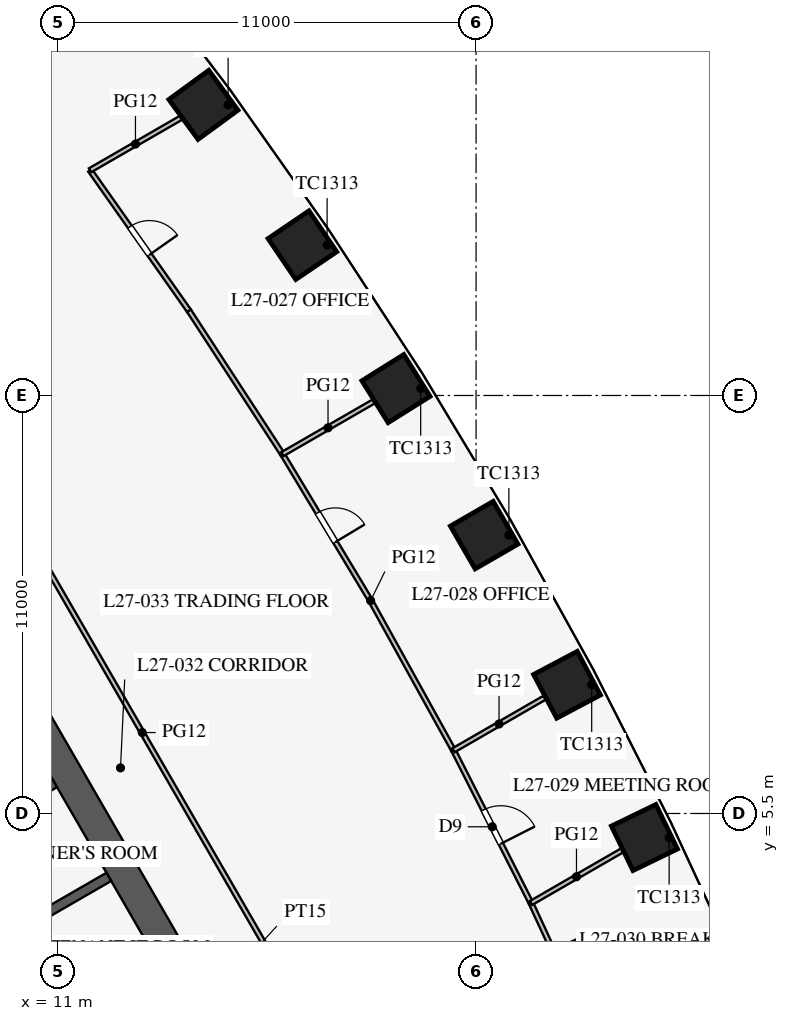
"""IFC4 building model, lengths in metres.
Left out: names, types, materials, properties, quantities, classifications, styles, units other than length and angle.
Written with IfcOpenShell. Run it as: python <this file> out.ifc"""

import sys

from ifc_helpers import new_model, si_unit, direction, frame, frame_2d, origin, origin_2d, place, context, subcontext, project, spatial, rectangle, extrude, element, fill, save


model = new_model("IFC4")
c1 = context("Model", 3, precision=1e-05, world=origin(), true_north=direction((0.0, 1.0)))
c2 = subcontext(c1, "Body", "Model", "MODEL_VIEW")
j1 = project(units=[si_unit("LENGTHUNIT", "METRE"), si_unit("PLANEANGLEUNIT", "RADIAN")], contexts=[c1])
p1 = place(None, origin())
s1 = spatial("IfcSite", under=j1, at=p1, CompositionType="ELEMENT")
p2 = place(p1, origin())
s2 = spatial("IfcBuilding", under=s1, at=p2, CompositionType="ELEMENT")
p3 = place(p2, frame((0.0, 0.0, 119.9)))
s3 = spatial("IfcBuildingStorey", under=s2, at=p3, CompositionType="ELEMENT", Elevation=119.9)
for number, where, z_axis, x_axis in (
    (1, (26.43, 4.867, 0.0), (0.0, 0.0, 1.0), (-0.436, 0.9, 0.0)),
    (2, (24.393, 8.887, 0.0), (0.0, 0.0, 1.0), (-0.468, 0.883, 0.0)),
    (3, (22.213, 12.825, 0.0), (0.0, 0.0, 1.0), (-0.5, 0.866, 0.0)),
    (4, (19.893, 16.681, 0.0), (0.0, 0.0, 1.0), (-0.531, 0.847, 0.0)),
    (5, (17.43, 20.456, 0.0), (0.0, 0.0, 1.0), (-0.561, 0.828, 0.0)),
    (6, (14.825, 24.148, 0.0), (0.0, 0.0, 1.0), (-0.591, 0.807, 0.0)),
):
    element("IfcColumn", number, at=place(p3, frame(where, z_axis=z_axis, x_axis=x_axis)), inside=s3, PredefinedType="COLUMN", context=c2, shape_type="SweptSolid", body=[
        extrude(rectangle(XDim=1.3, YDim=1.3, at=origin_2d()), origin(), (0.0, 0.0, 1.0), 4.2),
    ])
p4 = place(p3, frame((16.743, -3.0, 0.0), z_axis=(0.0, 0.0, 1.0), x_axis=(-0.500002442456, 0.866023993627, 0.0)))
e7 = element("IfcWall", 7, at=p4, inside=s3, PredefinedType="SHEAR", context=c2, shape_type="SweptSolid", body=[
    extrude(rectangle(XDim=21.939, YDim=0.8, at=frame_2d((10.97, 0.0))), origin(), (0.0, 0.0, 1.0), 4.2),
])
p5 = place(p4, frame((17.27, 0.0, 0.0)))
e8 = element("IfcOpeningElement", 8, at=p5, cuts=e7, PredefinedType="OPENING", context=c2, shape_type="SweptSolid", body=[
    extrude(rectangle(XDim=1.2, YDim=2.1, at=frame_2d((0.6, 1.05))), frame((0.0, 0.41, 0.0), z_axis=(0.0, -1.0, 0.0), x_axis=(1.0, 0.0, 0.0)), (0.0, 0.0, 1.0), 0.82),
])
p6 = place(p4, frame((3.47, 0.0, 0.0)))
e9 = element("IfcOpeningElement", 9, at=p6, cuts=e7, PredefinedType="OPENING", context=c2, shape_type="SweptSolid", body=[
    extrude(rectangle(XDim=1.2, YDim=2.1, at=frame_2d((0.6, 1.05))), frame((0.0, 0.41, 0.0), z_axis=(0.0, -1.0, 0.0), x_axis=(1.0, 0.0, 0.0)), (0.0, 0.0, 1.0), 0.82),
])
p7 = place(p3, frame((11.424, 0.014, 0.0), z_axis=(0.0, 0.0, 1.0), x_axis=(-0.500001763848, 0.866024385424, 0.0)))
e10 = element("IfcWall", 10, at=p7, inside=s3, PredefinedType="SHEAR", context=c2, shape_type="SweptSolid", body=[
    extrude(rectangle(XDim=11.4, YDim=0.25, at=frame_2d((5.7, 0.0))), origin(), (0.0, 0.0, 1.0), 4.2),
])
p8 = place(p7, frame((0.975, 0.0, 0.0)))
e11 = element("IfcOpeningElement", 11, at=p8, cuts=e10, PredefinedType="OPENING", context=c2, shape_type="SweptSolid", body=[
    extrude(rectangle(XDim=0.9, YDim=2.1, at=frame_2d((0.45, 1.05))), frame((0.0, 0.135, 0.0), z_axis=(0.0, -1.0, 0.0), x_axis=(1.0, 0.0, 0.0)), (0.0, 0.0, 1.0), 0.27),
])
p9 = place(p7, frame((3.825, 0.0, 0.0)))
e12 = element("IfcOpeningElement", 12, at=p9, cuts=e10, PredefinedType="OPENING", context=c2, shape_type="SweptSolid", body=[
    extrude(rectangle(XDim=0.9, YDim=2.1, at=frame_2d((0.45, 1.05))), frame((0.0, 0.135, 0.0), z_axis=(0.0, -1.0, 0.0), x_axis=(1.0, 0.0, 0.0)), (0.0, 0.0, 1.0), 0.27),
])
for number, where, z_axis, x_axis in (
    (13, (10.107, 2.544, 0.0), (0.0, 0.0, 1.0), (0.866, 0.5, 0.0)),
    (14, (8.682, 5.012, 0.0), (0.0, 0.0, 1.0), (0.866, 0.5, 0.0)),
):
    element("IfcWall", number, at=place(p3, frame(where, z_axis=z_axis, x_axis=x_axis)), inside=s3, PredefinedType="SHEAR", context=c2, shape_type="SweptSolid", body=[
        extrude(rectangle(XDim=2.575, YDim=0.25, at=frame_2d((1.288, 0.0))), origin(), (0.0, 0.0, 1.0), 4.2),
    ])
p10 = place(p3, frame((26.415, -15.231, 0.0), z_axis=(0.0, 0.0, 1.0), x_axis=(-0.50000091641, 0.866024874695, 0.0)))
e15 = element("IfcWall", 15, at=p10, inside=s3, PredefinedType="PARTITIONING", context=c2, shape_type="SweptSolid", body=[
    extrude(rectangle(XDim=52.796, YDim=0.12, at=frame_2d((26.398, 0.0))), origin(), (0.0, 0.0, 1.0), 2.9),
])
p11 = place(p10, frame((10.2, 0.0, 0.15)))
e16 = element("IfcOpeningElement", 16, at=p11, cuts=e15, PredefinedType="OPENING", context=c2, shape_type="SweptSolid", body=[
    extrude(rectangle(XDim=1.8, YDim=2.1, at=frame_2d((0.9, 1.05))), frame((0.0, 0.07, 0.0), z_axis=(0.0, -1.0, 0.0), x_axis=(1.0, 0.0, 0.0)), (0.0, 0.0, 1.0), 0.14),
])
p12 = place(p10, frame((40.8, 0.0, 0.15)))
e17 = element("IfcOpeningElement", 17, at=p12, cuts=e15, PredefinedType="OPENING", context=c2, shape_type="SweptSolid", body=[
    extrude(rectangle(XDim=1.8, YDim=2.1, at=frame_2d((0.9, 1.05))), frame((0.0, 0.07, 0.0), z_axis=(0.0, -1.0, 0.0), x_axis=(1.0, 0.0, 0.0)), (0.0, 0.0, 1.0), 0.14),
])
p13 = place(p3, frame((19.226, 11.1, 0.0), z_axis=(0.0, 0.0, 1.0), x_axis=(-0.515548366618, 0.856860479703, 0.0)))
e18 = element("IfcWall", 18, at=p13, inside=s3, PredefinedType="PARTITIONING", context=c2, shape_type="SweptSolid", body=[
    extrude(rectangle(XDim=4.501, YDim=0.12, at=frame_2d((2.25, 0.0))), origin(), (0.0, 0.0, 1.0), 2.9),
])
p14 = place(p13, frame((1.8, 0.0, 0.15)))
e19 = element("IfcOpeningElement", 19, at=p14, cuts=e18, PredefinedType="OPENING", context=c2, shape_type="SweptSolid", body=[
    extrude(rectangle(XDim=0.9, YDim=2.1, at=frame_2d((0.45, 1.05))), frame((0.0, 0.07, 0.0), z_axis=(0.0, -1.0, 0.0), x_axis=(1.0, 0.0, 0.0)), (0.0, 0.0, 1.0), 0.14),
])
p15 = place(p3, frame((16.905, 14.956, 0.0), z_axis=(0.0, 0.0, 1.0), x_axis=(-0.546069464151, 0.837739900161, 0.0)))
e20 = element("IfcWall", 20, at=p15, inside=s3, PredefinedType="PARTITIONING", context=c2, shape_type="SweptSolid", body=[
    extrude(rectangle(XDim=4.507, YDim=0.12, at=frame_2d((2.253, 0.0))), origin(), (0.0, 0.0, 1.0), 2.9),
])
p16 = place(p3, frame((14.444, 18.732, 0.0), z_axis=(0.0, 0.0, 1.0), x_axis=(-0.576023283708, 0.817433285734, 0.0)))
e21 = element("IfcWall", 21, at=p16, inside=s3, PredefinedType="PARTITIONING", context=c2, shape_type="SweptSolid", body=[
    extrude(rectangle(XDim=4.519, YDim=0.12, at=frame_2d((2.259, 0.0))), origin(), (0.0, 0.0, 1.0), 2.9),
])
p17 = place(p16, frame((1.8, 0.0, 0.15)))
e22 = element("IfcOpeningElement", 22, at=p17, cuts=e21, PredefinedType="OPENING", context=c2, shape_type="SweptSolid", body=[
    extrude(rectangle(XDim=0.9, YDim=2.1, at=frame_2d((0.45, 1.05))), frame((0.0, 0.07, 0.0), z_axis=(0.0, -1.0, 0.0), x_axis=(1.0, 0.0, 0.0)), (0.0, 0.0, 1.0), 0.14),
])
p18 = place(p3, frame((25.342, -0.958, 0.0), z_axis=(0.0, 0.0, 1.0), x_axis=(-0.419883773418, 0.907577884713, 0.0)))
e23 = element("IfcWall", 23, at=p18, inside=s3, PredefinedType="PARTITIONING", context=c2, shape_type="SweptSolid", body=[
    extrude(rectangle(XDim=4.519, YDim=0.12, at=frame_2d((2.259, 0.0))), origin(), (0.0, 0.0, 1.0), 2.9),
])
p19 = place(p18, frame((1.35, 0.0, 0.15)))
e24 = element("IfcOpeningElement", 24, at=p19, cuts=e23, PredefinedType="OPENING", context=c2, shape_type="SweptSolid", body=[
    extrude(rectangle(XDim=1.8, YDim=2.1, at=frame_2d((0.9, 1.05))), frame((0.0, 0.07, 0.0), z_axis=(0.0, -1.0, 0.0), x_axis=(1.0, 0.0, 0.0)), (0.0, 0.0, 1.0), 0.14),
])
p20 = place(p3, frame((21.405, 7.162, 0.0), z_axis=(0.0, 0.0, 1.0), x_axis=(-0.484292898211, 0.874905931368, 0.0)))
e25 = element("IfcWall", 25, at=p20, inside=s3, PredefinedType="PARTITIONING", context=c2, shape_type="SweptSolid", body=[
    extrude(rectangle(XDim=4.501, YDim=0.12, at=frame_2d((2.25, 0.0))), origin(), (0.0, 0.0, 1.0), 2.9),
])
p21 = place(p3, frame((23.444, 3.143, 0.0), z_axis=(0.0, 0.0, 1.0), x_axis=(-0.452471679136, 0.891778772779, 0.0)))
e26 = element("IfcWall", 26, at=p21, inside=s3, PredefinedType="PARTITIONING", context=c2, shape_type="SweptSolid", body=[
    extrude(rectangle(XDim=4.507, YDim=0.12, at=frame_2d((2.253, 0.0))), origin(), (0.0, 0.0, 1.0), 2.9),
])
p22 = place(p21, frame((1.75, 0.0, 0.15)))
e27 = element("IfcOpeningElement", 27, at=p22, cuts=e26, PredefinedType="OPENING", context=c2, shape_type="SweptSolid", body=[
    extrude(rectangle(XDim=1.0, YDim=2.1, at=frame_2d((0.5, 1.05))), frame((0.0, 0.07, 0.0), z_axis=(0.0, -1.0, 0.0), x_axis=(1.0, 0.0, 0.0)), (0.0, 0.0, 1.0), 0.14),
])
p23 = place(p3, frame((11.842, 22.425, 0.0), z_axis=(0.0, 0.0, 1.0), x_axis=(0.866053089527, 0.499952043821, 0.0)))
e28 = element("IfcWall", 28, at=p23, inside=s3, PredefinedType="PARTITIONING", context=c2, shape_type="SweptSolid", body=[
    extrude(rectangle(XDim=2.761, YDim=0.12, at=frame_2d((1.381, 0.0))), origin(), (0.0, 0.0, 1.0), 2.9),
])
for number, where, z_axis, x_axis in (
    (29, (16.905, 14.956, 0.0), (0.0, 0.0, 1.0), (0.866, 0.5, 0.0)),
    (30, (21.405, 7.162, 0.0), (0.0, 0.0, 1.0), (0.866, 0.5, 0.0)),
):
    element("IfcWall", number, at=place(p3, frame(where, z_axis=z_axis, x_axis=x_axis)), inside=s3, PredefinedType="PARTITIONING", context=c2, shape_type="SweptSolid", body=[
        extrude(rectangle(XDim=2.769, YDim=0.12, at=frame_2d((1.385, 0.0))), origin(), (0.0, 0.0, 1.0), 2.9),
    ])
p24 = place(p3, frame((23.444, 3.143, 0.0), z_axis=(0.0, 0.0, 1.0), x_axis=(0.866023907196, 0.500002592159, 0.0)))
e31 = element("IfcWall", 31, at=p24, inside=s3, PredefinedType="PARTITIONING", context=c2, shape_type="SweptSolid", body=[
    extrude(rectangle(XDim=2.766, YDim=0.12, at=frame_2d((1.383, 0.0))), origin(), (0.0, 0.0, 1.0), 2.9),
])
p25 = place(p17, frame((0.9, 0.0, 0.0), z_axis=(0.0, 0.0, 1.0), x_axis=(-1.0, 0.0, 0.0)))
e32 = element("IfcDoor", 32, at=p25, inside=s3, OperationType="SINGLE_SWING_RIGHT", PredefinedType="DOOR", context=c2, shape_type="SweptSolid", body=[
    extrude(rectangle(XDim=0.9, YDim=2.1, at=frame_2d((0.45, 1.05))), frame((0.0, 0.025, 0.0), z_axis=(0.0, -1.0, 0.0), x_axis=(1.0, 0.0, 0.0)), (0.0, 0.0, 1.0), 0.05),
])
fill(e22, e32)
p26 = place(p14, frame((0.9, 0.0, 0.0), z_axis=(0.0, 0.0, 1.0), x_axis=(-1.0, 0.0, 0.0)))
e33 = element("IfcDoor", 33, at=p26, inside=s3, OperationType="SINGLE_SWING_RIGHT", PredefinedType="DOOR", context=c2, shape_type="SweptSolid", body=[
    extrude(rectangle(XDim=0.9, YDim=2.1, at=frame_2d((0.45, 1.05))), frame((0.0, 0.025, 0.0), z_axis=(0.0, -1.0, 0.0), x_axis=(1.0, 0.0, 0.0)), (0.0, 0.0, 1.0), 0.05),
])
fill(e19, e33)
p27 = place(p22, frame((1.0, 0.0, 0.0), z_axis=(0.0, 0.0, 1.0), x_axis=(-1.0, 0.0, 0.0)))
e34 = element("IfcDoor", 34, at=p27, inside=s3, OperationType="SINGLE_SWING_RIGHT", PredefinedType="DOOR", context=c2, shape_type="SweptSolid", body=[
    extrude(rectangle(XDim=1.0, YDim=2.1, at=frame_2d((0.5, 1.05))), frame((0.0, 0.025, 0.0), z_axis=(0.0, -1.0, 0.0), x_axis=(1.0, 0.0, 0.0)), (0.0, 0.0, 1.0), 0.05),
])
fill(e27, e34)
save(model, sys.argv[1])
